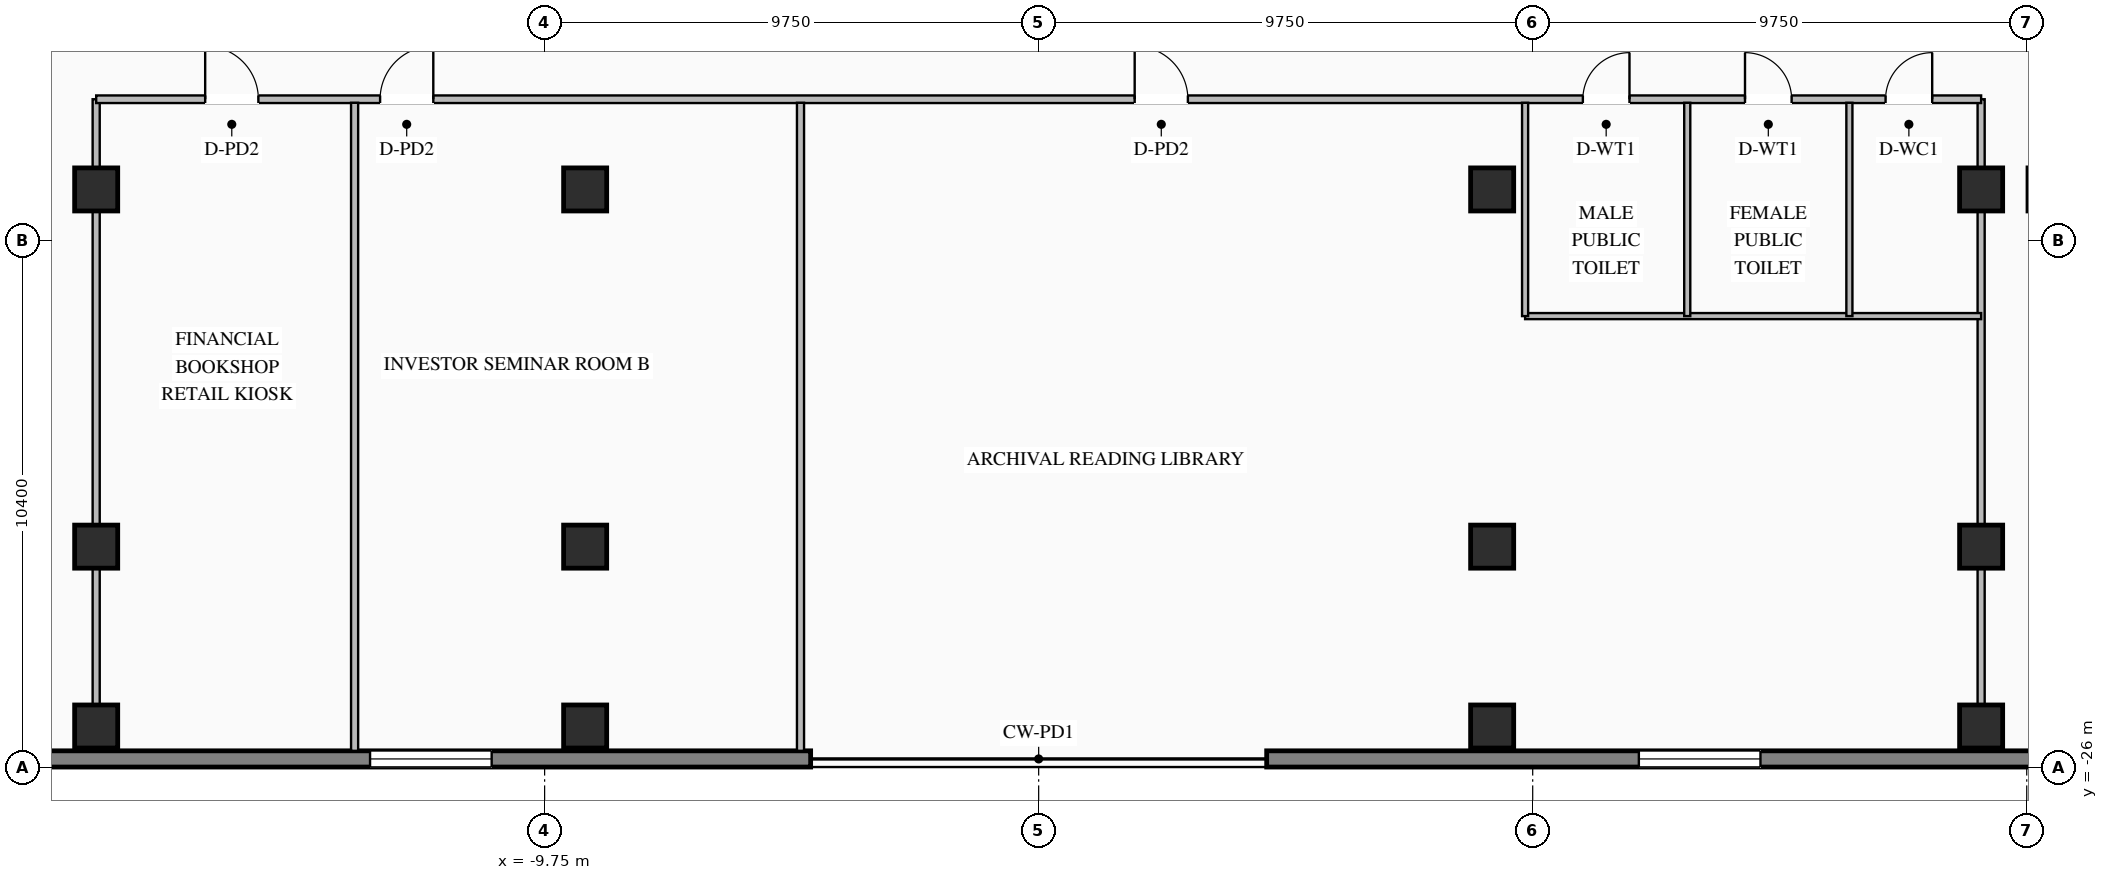
"""IFC4 building model, lengths in metres.
Left out: names, types, materials, properties, quantities, classifications, styles, units other than length and angle.
Written with IfcOpenShell. Run it as: python <this file> out.ifc"""

import sys

from ifc_helpers import new_model, si_unit, direction, frame, frame_2d, origin, origin_2d, place, context, subcontext, project, spatial, rectangle, i_section, extrude, element, fill, save


model = new_model("IFC4")
c1 = context("Model", 3, precision=1e-05, world=origin(), true_north=direction((0.0, 1.0)))
c2 = subcontext(c1, "Body", "Model", "MODEL_VIEW")
j1 = project(units=[si_unit("LENGTHUNIT", "METRE"), si_unit("PLANEANGLEUNIT", "RADIAN")], contexts=[c1])
p1 = place(None, origin())
s1 = spatial("IfcSite", under=j1, at=p1, CompositionType="ELEMENT")
p2 = place(p1, origin())
s2 = spatial("IfcBuilding", under=s1, at=p2, CompositionType="ELEMENT")
p3 = place(p2, frame((0.0, 0.0, 9.6)))
s3 = spatial("IfcBuildingStorey", under=s2, at=p3, CompositionType="ELEMENT", Elevation=9.6)
for number, where, z_axis, x_axis in (
    (1, (-18.6, -14.6, 0.0), (0.0, 0.0, 1.0), (1.0, 0.0, 0.0)),
    (2, (-8.95, -14.6, 0.0), (0.0, 0.0, 1.0), (1.0, 0.0, 0.0)),
    (3, (8.95, -14.6, 0.0), (0.0, 0.0, 1.0), (1.0, 0.0, 0.0)),
    (4, (18.6, -14.6, 0.0), (0.0, 0.0, 1.0), (1.0, 0.0, 0.0)),
    (5, (19.95, -14.6, 0.0), (0.0, 0.0, 1.0), (1.0, 0.0, 0.0)),
    (6, (-18.6, -21.65, 0.0), (0.0, 0.0, 1.0), (1.0, 0.0, 0.0)),
    (7, (-8.95, -21.65, 0.0), (0.0, 0.0, 1.0), (1.0, 0.0, 0.0)),
    (8, (8.95, -21.65, 0.0), (0.0, 0.0, 1.0), (1.0, 0.0, 0.0)),
    (9, (18.6, -21.65, 0.0), (0.0, 0.0, 1.0), (1.0, 0.0, 0.0)),
    (10, (-18.6, -25.2, 0.0), (0.0, 0.0, 1.0), (1.0, 0.0, 0.0)),
    (11, (-8.95, -25.2, 0.0), (0.0, 0.0, 1.0), (1.0, 0.0, 0.0)),
    (12, (8.95, -25.2, 0.0), (0.0, 0.0, 1.0), (1.0, 0.0, 0.0)),
    (13, (18.6, -25.2, 0.0), (0.0, 0.0, 1.0), (1.0, 0.0, 0.0)),
):
    element("IfcColumn", number, at=place(p3, frame(where, z_axis=z_axis, x_axis=x_axis)), inside=s3, PredefinedType="COLUMN", context=c2, shape_type="SweptSolid", body=[
        extrude(i_section(OverallWidth=0.85, OverallDepth=0.85, WebThickness=0.032, FlangeThickness=0.048, at=origin_2d()), origin(), (0.0, 0.0, 1.0), 4.5),
    ])
p4 = place(p3, frame((38.68, -25.84, 0.0), z_axis=(0.0, 0.0, 1.0), x_axis=(-1.0, 0.0, 0.0)))
e14 = element("IfcWall", 14, at=p4, inside=s3, PredefinedType="STANDARD", context=c2, shape_type="SweptSolid", body=[
    extrude(rectangle(XDim=34.18, YDim=0.32, at=frame_2d((17.09, 0.0))), origin(), (0.0, 0.0, 1.0), 4.23),
])
p5 = place(p4, frame((6.795, 0.0, 0.8)))
e15 = element("IfcOpeningElement", 15, at=p5, cuts=e14, PredefinedType="OPENING", context=c2, shape_type="SweptSolid", body=[
    extrude(rectangle(XDim=2.4, YDim=2.35, at=frame_2d((1.2, 1.175))), frame((0.0, 0.17, 0.0), z_axis=(0.0, -1.0, 0.0), x_axis=(1.0, 0.0, 0.0)), (0.0, 0.0, 1.0), 0.34),
])
p6 = place(p4, frame((16.44, 0.0, 0.8)))
e16 = element("IfcOpeningElement", 16, at=p6, cuts=e14, PredefinedType="OPENING", context=c2, shape_type="SweptSolid", body=[
    extrude(rectangle(XDim=2.4, YDim=2.35, at=frame_2d((1.2, 1.175))), frame((0.0, 0.17, 0.0), z_axis=(0.0, -1.0, 0.0), x_axis=(1.0, 0.0, 0.0)), (0.0, 0.0, 1.0), 0.34),
])
p7 = place(p4, frame((24.435, 0.0, 0.8)))
e17 = element("IfcOpeningElement", 17, at=p7, cuts=e14, PredefinedType="OPENING", context=c2, shape_type="SweptSolid", body=[
    extrude(rectangle(XDim=2.4, YDim=2.35, at=frame_2d((1.2, 1.175))), frame((0.0, 0.17, 0.0), z_axis=(0.0, -1.0, 0.0), x_axis=(1.0, 0.0, 0.0)), (0.0, 0.0, 1.0), 0.34),
])
p8 = place(p3, frame((-4.5, -25.84, 0.0), z_axis=(0.0, 0.0, 1.0), x_axis=(-1.0, 0.0, 0.0)))
e18 = element("IfcWall", 18, at=p8, inside=s3, PredefinedType="STANDARD", context=c2, shape_type="SweptSolid", body=[
    extrude(rectangle(XDim=34.18, YDim=0.32, at=frame_2d((17.09, 0.0))), origin(), (0.0, 0.0, 1.0), 4.23),
])
p9 = place(p8, frame((6.295, 0.0, 0.8)))
e19 = element("IfcOpeningElement", 19, at=p9, cuts=e18, PredefinedType="OPENING", context=c2, shape_type="SweptSolid", body=[
    extrude(rectangle(XDim=2.4, YDim=2.35, at=frame_2d((1.2, 1.175))), frame((0.0, 0.17, 0.0), z_axis=(0.0, -1.0, 0.0), x_axis=(1.0, 0.0, 0.0)), (0.0, 0.0, 1.0), 0.34),
])
p10 = place(p8, frame((15.34, 0.0, 0.8)))
e20 = element("IfcOpeningElement", 20, at=p10, cuts=e18, PredefinedType="OPENING", context=c2, shape_type="SweptSolid", body=[
    extrude(rectangle(XDim=2.4, YDim=2.35, at=frame_2d((1.2, 1.175))), frame((0.0, 0.17, 0.0), z_axis=(0.0, -1.0, 0.0), x_axis=(1.0, 0.0, 0.0)), (0.0, 0.0, 1.0), 0.34),
])
p11 = place(p8, frame((24.985, 0.0, 0.8)))
e21 = element("IfcOpeningElement", 21, at=p11, cuts=e18, PredefinedType="OPENING", context=c2, shape_type="SweptSolid", body=[
    extrude(rectangle(XDim=2.4, YDim=2.35, at=frame_2d((1.2, 1.175))), frame((0.0, 0.17, 0.0), z_axis=(0.0, -1.0, 0.0), x_axis=(1.0, 0.0, 0.0)), (0.0, 0.0, 1.0), 0.34),
])
for number, where, z_axis, x_axis in (
    (22, (-18.6, -25.68, 0.0), (0.0, 0.0, 1.0), (0.0, 1.0, 0.0)),
    (23, (18.6, -25.68, 0.0), (0.0, 0.0, 1.0), (0.0, 1.0, 0.0)),
):
    element("IfcWall", number, at=place(p3, frame(where, z_axis=z_axis, x_axis=x_axis)), inside=s3, PredefinedType="STANDARD", context=c2, shape_type="SweptSolid", body=[
        extrude(rectangle(XDim=12.86, YDim=0.14, at=frame_2d((6.43, 0.0))), origin(), (0.0, 0.0, 1.0), 3.525),
    ])
p12 = place(p3, frame((-18.6, -12.82, 0.0), z_axis=(0.0, 0.0, 1.0), x_axis=(1.0, 0.0, 0.0)))
e24 = element("IfcWall", 24, at=p12, inside=s3, PredefinedType="STANDARD", context=c2, shape_type="SweptSolid", body=[
    extrude(rectangle(XDim=37.2, YDim=0.15, at=frame_2d((18.6, 0.0))), origin(), (0.0, 0.0, 1.0), 4.23),
])
p13 = place(p12, frame((29.34, 0.0, 0.0)))
e25 = element("IfcOpeningElement", 25, at=p13, cuts=e24, PredefinedType="OPENING", context=c2, shape_type="SweptSolid", body=[
    extrude(rectangle(XDim=0.92, YDim=2.08, at=frame_2d((0.46, 1.04))), frame((0.0, 0.085, 0.0), z_axis=(0.0, -1.0, 0.0), x_axis=(1.0, 0.0, 0.0)), (0.0, 0.0, 1.0), 0.17),
])
p14 = place(p12, frame((32.54, 0.0, 0.0)))
e26 = element("IfcOpeningElement", 26, at=p14, cuts=e24, PredefinedType="OPENING", context=c2, shape_type="SweptSolid", body=[
    extrude(rectangle(XDim=0.92, YDim=2.08, at=frame_2d((0.46, 1.04))), frame((0.0, 0.085, 0.0), z_axis=(0.0, -1.0, 0.0), x_axis=(1.0, 0.0, 0.0)), (0.0, 0.0, 1.0), 0.17),
])
p15 = place(p12, frame((35.314, 0.0, 0.0)))
e27 = element("IfcOpeningElement", 27, at=p15, cuts=e24, PredefinedType="OPENING", context=c2, shape_type="SweptSolid", body=[
    extrude(rectangle(XDim=0.92, YDim=2.08, at=frame_2d((0.46, 1.04))), frame((0.0, 0.085, 0.0), z_axis=(0.0, -1.0, 0.0), x_axis=(1.0, 0.0, 0.0)), (0.0, 0.0, 1.0), 0.17),
])
p16 = place(p12, frame((2.151, 0.0, 0.0)))
e28 = element("IfcOpeningElement", 28, at=p16, cuts=e24, PredefinedType="OPENING", context=c2, shape_type="SweptSolid", body=[
    extrude(rectangle(XDim=1.05, YDim=2.08, at=frame_2d((0.525, 1.04))), frame((0.0, 0.085, 0.0), z_axis=(0.0, -1.0, 0.0), x_axis=(1.0, 0.0, 0.0)), (0.0, 0.0, 1.0), 0.17),
])
p17 = place(p12, frame((5.603, 0.0, 0.0)))
e29 = element("IfcOpeningElement", 29, at=p17, cuts=e24, PredefinedType="OPENING", context=c2, shape_type="SweptSolid", body=[
    extrude(rectangle(XDim=1.05, YDim=2.08, at=frame_2d((0.525, 1.04))), frame((0.0, 0.085, 0.0), z_axis=(0.0, -1.0, 0.0), x_axis=(1.0, 0.0, 0.0)), (0.0, 0.0, 1.0), 0.17),
])
p18 = place(p12, frame((20.495, 0.0, 0.0)))
e30 = element("IfcOpeningElement", 30, at=p18, cuts=e24, PredefinedType="OPENING", context=c2, shape_type="SweptSolid", body=[
    extrude(rectangle(XDim=1.05, YDim=2.08, at=frame_2d((0.525, 1.04))), frame((0.0, 0.085, 0.0), z_axis=(0.0, -1.0, 0.0), x_axis=(1.0, 0.0, 0.0)), (0.0, 0.0, 1.0), 0.17),
])
p19 = place(p3, frame((9.6, -17.1, 0.0), z_axis=(0.0, 0.0, 1.0), x_axis=(1.0, 0.0, 0.0)))
e31 = element("IfcWall", 31, at=p19, inside=s3, PredefinedType="STANDARD", context=c2, shape_type="SweptSolid", body=[
    extrude(rectangle(XDim=9.0, YDim=0.12, at=frame_2d((4.5, 0.0))), origin(), (0.0, 0.0, 1.0), 4.23),
])
for number, where, z_axis, x_axis in (
    (32, (9.6, -17.1, 0.0), (0.0, 0.0, 1.0), (0.0, 1.0, 0.0)),
    (33, (12.8, -17.1, 0.0), (0.0, 0.0, 1.0), (0.0, 1.0, 0.0)),
    (34, (16.0, -17.1, 0.0), (0.0, 0.0, 1.0), (0.0, 1.0, 0.0)),
):
    element("IfcWall", number, at=place(p3, frame(where, z_axis=z_axis, x_axis=x_axis)), inside=s3, PredefinedType="STANDARD", context=c2, shape_type="SweptSolid", body=[
        extrude(rectangle(XDim=4.21, YDim=0.12, at=frame_2d((2.105, 0.0))), origin(), (0.0, 0.0, 1.0), 4.23),
    ])
for number, where, z_axis, x_axis in (
    (35, (-13.5, -25.68, 0.0), (0.0, 0.0, 1.0), (0.0, 1.0, 0.0)),
    (36, (-4.7, -25.68, 0.0), (0.0, 0.0, 1.0), (0.0, 1.0, 0.0)),
):
    element("IfcWall", number, at=place(p3, frame(where, z_axis=z_axis, x_axis=x_axis)), inside=s3, PredefinedType="STANDARD", context=c2, shape_type="SweptSolid", body=[
        extrude(rectangle(XDim=12.79, YDim=0.14, at=frame_2d((6.395, 0.0))), origin(), (0.0, 0.0, 1.0), 4.23),
    ])
p20 = place(p7, origin())
e37 = element("IfcWindow", 37, at=p20, inside=s3, PartitioningType="DOUBLE_PANEL_VERTICAL", PredefinedType="WINDOW", context=c2, shape_type="SweptSolid", body=[
    extrude(rectangle(XDim=2.4, YDim=2.35, at=frame_2d((1.2, 1.175))), frame((0.0, 0.03, 0.0), z_axis=(0.0, -1.0, 0.0), x_axis=(1.0, 0.0, 0.0)), (0.0, 0.0, 1.0), 0.06),
])
fill(e17, e37)
p21 = place(p9, origin())
e38 = element("IfcWindow", 38, at=p21, inside=s3, PartitioningType="DOUBLE_PANEL_VERTICAL", PredefinedType="WINDOW", context=c2, shape_type="SweptSolid", body=[
    extrude(rectangle(XDim=2.4, YDim=2.35, at=frame_2d((1.2, 1.175))), frame((0.0, 0.03, 0.0), z_axis=(0.0, -1.0, 0.0), x_axis=(1.0, 0.0, 0.0)), (0.0, 0.0, 1.0), 0.06),
])
fill(e19, e38)
p22 = place(p13, origin())
e39 = element("IfcDoor", 39, at=p22, inside=s3, OperationType="SINGLE_SWING_RIGHT", PredefinedType="DOOR", context=c2, shape_type="SweptSolid", body=[
    extrude(rectangle(XDim=0.92, YDim=2.08, at=frame_2d((0.46, 1.04))), frame((0.0, 0.025, 0.0), z_axis=(0.0, -1.0, 0.0), x_axis=(1.0, 0.0, 0.0)), (0.0, 0.0, 1.0), 0.05),
])
fill(e25, e39)
p23 = place(p14, origin())
e40 = element("IfcDoor", 40, at=p23, inside=s3, OperationType="SINGLE_SWING_LEFT", PredefinedType="DOOR", context=c2, shape_type="SweptSolid", body=[
    extrude(rectangle(XDim=0.92, YDim=2.08, at=frame_2d((0.46, 1.04))), frame((0.0, 0.025, 0.0), z_axis=(0.0, -1.0, 0.0), x_axis=(1.0, 0.0, 0.0)), (0.0, 0.0, 1.0), 0.05),
])
fill(e26, e40)
p24 = place(p15, origin())
e41 = element("IfcDoor", 41, at=p24, inside=s3, OperationType="SINGLE_SWING_RIGHT", PredefinedType="DOOR", context=c2, shape_type="SweptSolid", body=[
    extrude(rectangle(XDim=0.92, YDim=2.08, at=frame_2d((0.46, 1.04))), frame((0.0, 0.025, 0.0), z_axis=(0.0, -1.0, 0.0), x_axis=(1.0, 0.0, 0.0)), (0.0, 0.0, 1.0), 0.05),
])
fill(e27, e41)
p25 = place(p16, origin())
e42 = element("IfcDoor", 42, at=p25, inside=s3, OperationType="SINGLE_SWING_LEFT", PredefinedType="DOOR", context=c2, shape_type="SweptSolid", body=[
    extrude(rectangle(XDim=1.05, YDim=2.08, at=frame_2d((0.525, 1.04))), frame((0.0, 0.025, 0.0), z_axis=(0.0, -1.0, 0.0), x_axis=(1.0, 0.0, 0.0)), (0.0, 0.0, 1.0), 0.05),
])
fill(e28, e42)
p26 = place(p17, origin())
e43 = element("IfcDoor", 43, at=p26, inside=s3, OperationType="SINGLE_SWING_RIGHT", PredefinedType="DOOR", context=c2, shape_type="SweptSolid", body=[
    extrude(rectangle(XDim=1.05, YDim=2.08, at=frame_2d((0.525, 1.04))), frame((0.0, 0.025, 0.0), z_axis=(0.0, -1.0, 0.0), x_axis=(1.0, 0.0, 0.0)), (0.0, 0.0, 1.0), 0.05),
])
fill(e29, e43)
p27 = place(p18, origin())
e44 = element("IfcDoor", 44, at=p27, inside=s3, OperationType="SINGLE_SWING_LEFT", PredefinedType="DOOR", context=c2, shape_type="SweptSolid", body=[
    extrude(rectangle(XDim=1.05, YDim=2.08, at=frame_2d((0.525, 1.04))), frame((0.0, 0.025, 0.0), z_axis=(0.0, -1.0, 0.0), x_axis=(1.0, 0.0, 0.0)), (0.0, 0.0, 1.0), 0.05),
])
fill(e30, e44)
save(model, sys.argv[1])
